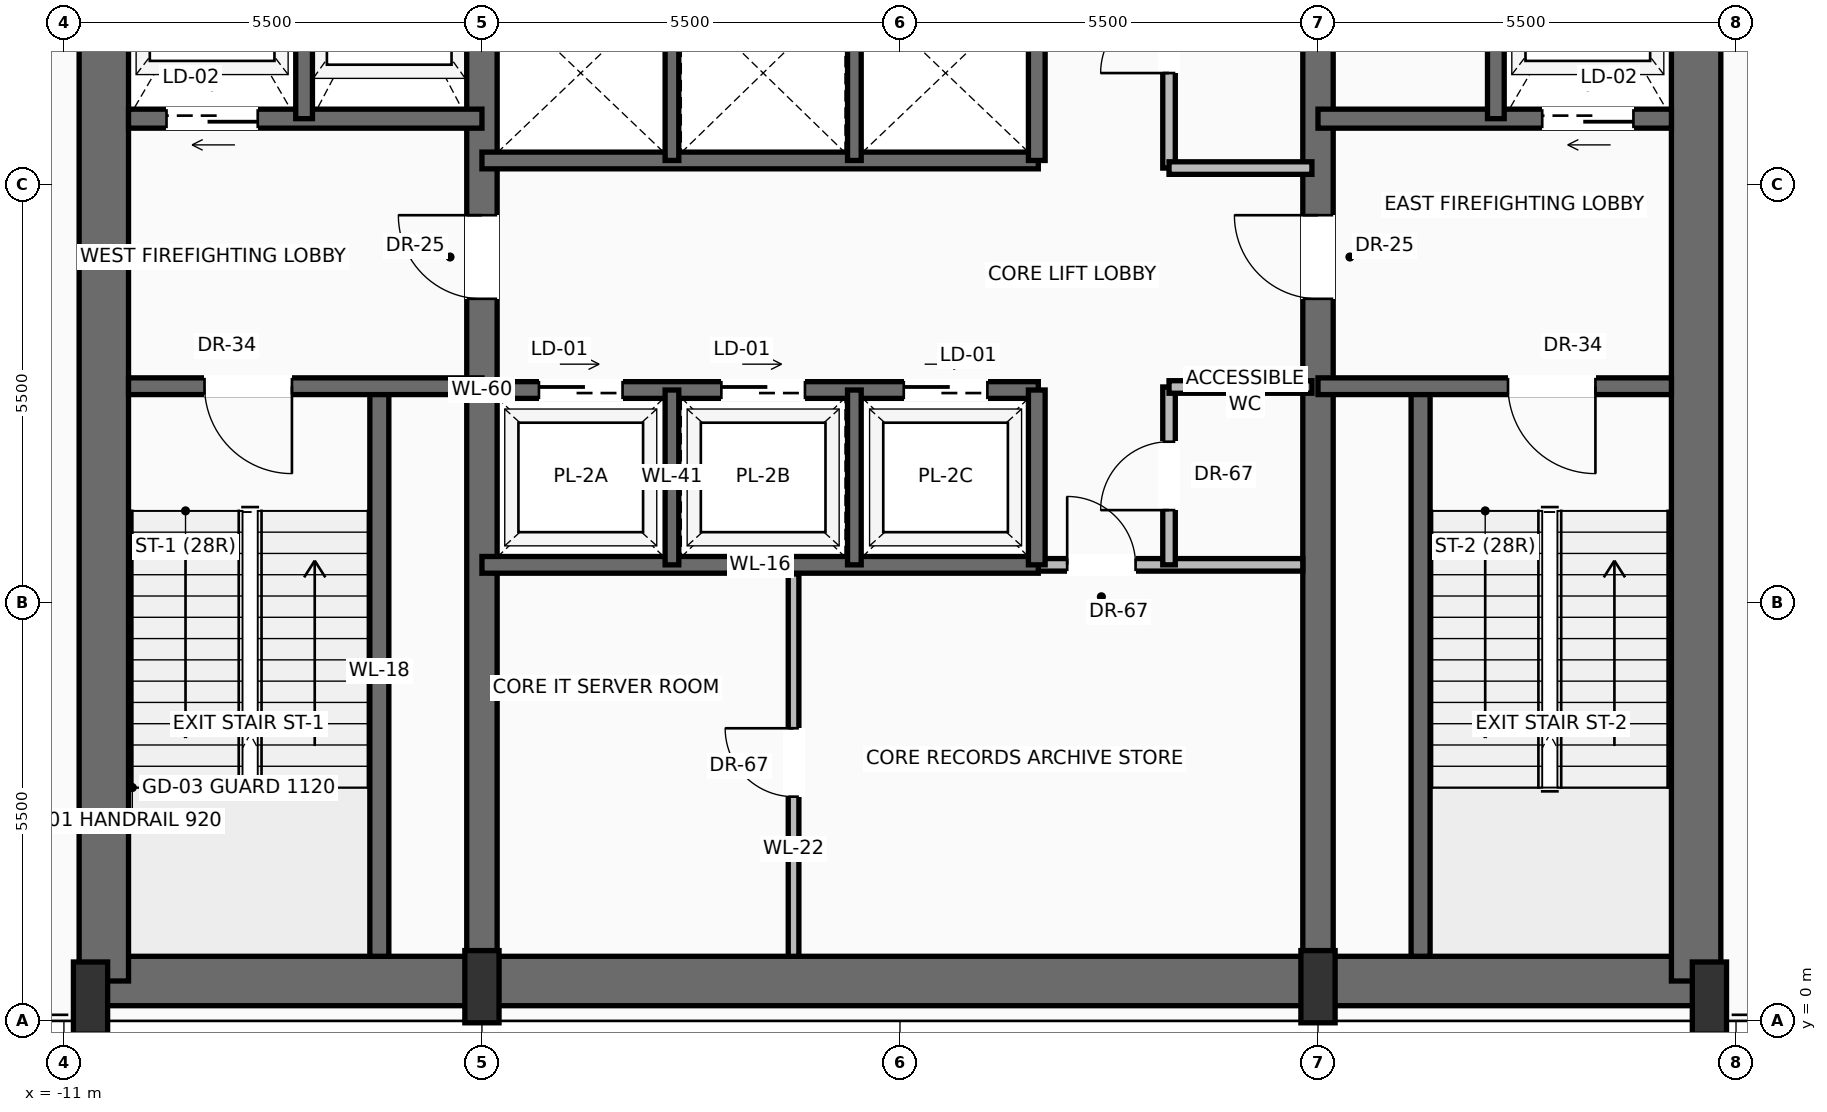
"""IFC4 building model, lengths in metres.
Left out: names, types, materials, properties, quantities, classifications, styles, units other than length and angle.
Written with IfcOpenShell. Run it as: python <this file> out.ifc"""

import sys

from ifc_helpers import new_model, si_unit, direction, frame, frame_2d, origin, origin_2d, place, context, subcontext, project, spatial, rectangle, extrude, source, transform, mapped, element, fill, save


model = new_model("IFC4")
c1 = context("Model", 3, precision=1e-05, world=origin(), true_north=direction((0.0, 1.0)))
c2 = subcontext(c1, "Body", "Model", "MODEL_VIEW")
j1 = project(units=[si_unit("LENGTHUNIT", "METRE"), si_unit("PLANEANGLEUNIT", "RADIAN")], contexts=[c1])
p1 = place(None, origin())
s1 = spatial("IfcSite", under=j1, at=p1, CompositionType="ELEMENT")
p2 = place(p1, origin())
s2 = spatial("IfcBuilding", under=s1, at=p2, CompositionType="ELEMENT")
p3 = place(p2, frame((0.0, 0.0, 166.3)))
s3 = spatial("IfcBuildingStorey", under=s2, at=p3, CompositionType="ELEMENT", Elevation=166.3)
p4 = place(p3, frame((-10.65, 0.525, 0.0), z_axis=(0.0, 0.0, 1.0), x_axis=(1.0, 0.0, 0.0)))
e1 = element("IfcWall", 1, at=p4, inside=s3, PredefinedType="SHEAR", context=c2, shape_type="SweptSolid", body=[
    extrude(rectangle(XDim=21.3, YDim=0.65, at=frame_2d((10.65, 0.0))), origin(), (0.0, 0.0, 1.0), 4.47),
])
for number, where, z_axis, x_axis in (
    (2, (-10.475, 0.525, 0.0), (0.0, 0.0, 1.0), (0.0, 1.0, 0.0)),
    (3, (10.475, 0.525, 0.0), (0.0, 0.0, 1.0), (0.0, 1.0, 0.0)),
):
    element("IfcWall", number, at=place(p3, frame(where, z_axis=z_axis, x_axis=x_axis)), inside=s3, PredefinedType="SHEAR", context=c2, shape_type="SweptSolid", body=[
        extrude(rectangle(XDim=15.55, YDim=0.65, at=frame_2d((7.775, 0.0))), origin(), (0.0, 0.0, 1.0), 4.47),
    ])
p5 = place(p3, frame((-5.5, 0.525, 0.0), z_axis=(0.0, 0.0, 1.0), x_axis=(0.0, 1.0, 0.0)))
e4 = element("IfcWall", 4, at=p5, inside=s3, PredefinedType="SHEAR", context=c2, shape_type="SweptSolid", body=[
    extrude(rectangle(XDim=15.55, YDim=0.4, at=frame_2d((7.775, 0.0))), origin(), (0.0, 0.0, 1.0), 4.47),
])
p6 = place(p5, frame((8.975, 0.0, 0.0)))
e5 = element("IfcOpeningElement", 5, at=p6, cuts=e4, PredefinedType="OPENING", context=c2, shape_type="SweptSolid", body=[
    extrude(rectangle(XDim=1.1, YDim=2.2, at=frame_2d((0.55, 1.1))), frame((0.0, 0.21, 0.0), z_axis=(0.0, -1.0, 0.0), x_axis=(1.0, 0.0, 0.0)), (0.0, 0.0, 1.0), 0.42),
])
p7 = place(p3, frame((5.5, 0.525, 0.0), z_axis=(0.0, 0.0, 1.0), x_axis=(0.0, 1.0, 0.0)))
e6 = element("IfcWall", 6, at=p7, inside=s3, PredefinedType="SHEAR", context=c2, shape_type="SweptSolid", body=[
    extrude(rectangle(XDim=15.55, YDim=0.4, at=frame_2d((7.775, 0.0))), origin(), (0.0, 0.0, 1.0), 4.47),
])
p8 = place(p7, frame((8.975, 0.0, 0.0)))
e7 = element("IfcOpeningElement", 7, at=p8, cuts=e6, PredefinedType="OPENING", context=c2, shape_type="SweptSolid", body=[
    extrude(rectangle(XDim=1.1, YDim=2.2, at=frame_2d((0.55, 1.1))), frame((0.0, 0.21, 0.0), z_axis=(0.0, -1.0, 0.0), x_axis=(1.0, 0.0, 0.0)), (0.0, 0.0, 1.0), 0.42),
])
m1 = source(origin(), c2, "Body", "SweptSolid", [
    extrude(rectangle(XDim=0.45, YDim=0.95, at=origin_2d()), origin(), (0.0, 0.0, 1.0), 4.7),
])
for number, where, z_axis, x_axis in (
    (8, (-10.65, 0.3, 0.0), (0.0, 0.0, 1.0), (1.0, 0.0, 0.0)),
    (9, (-5.5, 0.45, 0.0), (0.0, 0.0, 1.0), (1.0, 0.0, 0.0)),
    (10, (5.5, 0.45, 0.0), (0.0, 0.0, 1.0), (1.0, 0.0, 0.0)),
    (11, (10.65, 0.3, 0.0), (0.0, 0.0, 1.0), (1.0, 0.0, 0.0)),
):
    element("IfcColumn", number, at=place(p3, frame(where, z_axis=z_axis, x_axis=x_axis)), inside=s3, PredefinedType="PILASTER", context=c2, shape_type="MappedRepresentation", body=[
        mapped(m1, transform((0.0, 0.0, 0.0), scale=1.0)),
    ])
p9 = place(p3, frame((-6.85, 0.85, 0.0), z_axis=(0.0, 0.0, 1.0), x_axis=(0.0, 1.0, 0.0)))
e12 = element("IfcWall", 12, at=p9, inside=s3, PredefinedType="SOLIDWALL", context=c2, shape_type="SweptSolid", body=[
    extrude(rectangle(XDim=7.5, YDim=0.25, at=frame_2d((3.75, 0.0))), origin(), (0.0, 0.0, 1.0), 4.47),
])
p10 = place(p3, frame((-5.5, 8.35, 0.0), z_axis=(0.0, 0.0, 1.0), x_axis=(-1.0, 0.0, 0.0)))
e13 = element("IfcWall", 13, at=p10, inside=s3, PredefinedType="SOLIDWALL", context=c2, shape_type="SweptSolid", body=[
    extrude(rectangle(XDim=4.65, YDim=0.22, at=frame_2d((2.325, 0.0))), origin(), (0.0, 0.0, 1.0), 4.47),
])
p11 = place(p10, frame((2.5, 0.0, 0.0)))
e14 = element("IfcOpeningElement", 14, at=p11, cuts=e13, PredefinedType="OPENING", context=c2, shape_type="SweptSolid", body=[
    extrude(rectangle(XDim=1.15, YDim=2.2, at=frame_2d((0.575, 1.1))), frame((0.0, 0.12, 0.0), z_axis=(0.0, -1.0, 0.0), x_axis=(1.0, 0.0, 0.0)), (0.0, 0.0, 1.0), 0.24),
])
p12 = place(p3, frame((-5.5, 11.87, 0.0), z_axis=(0.0, 0.0, 1.0), x_axis=(-1.0, 0.0, 0.0)))
e15 = element("IfcWall", 15, at=p12, inside=s3, PredefinedType="SOLIDWALL", context=c2, shape_type="SweptSolid", body=[
    extrude(rectangle(XDim=4.65, YDim=0.25, at=frame_2d((2.325, 0.0))), origin(), (0.0, 0.0, 1.0), 4.47),
])
p13 = place(p12, frame((2.95, 0.0, 0.0)))
e16 = element("IfcOpeningElement", 16, at=p13, cuts=e15, PredefinedType="OPENING", context=c2, shape_type="SweptSolid", body=[
    extrude(rectangle(XDim=1.2, YDim=2.25, at=frame_2d((0.6, 1.125))), frame((0.0, 0.135, 0.0), z_axis=(0.0, -1.0, 0.0), x_axis=(1.0, 0.0, 0.0)), (0.0, 0.0, 1.0), 0.27),
])
p14 = place(p3, frame((-7.84, 11.87, 0.0), z_axis=(0.0, 0.0, 1.0), x_axis=(0.0, 1.0, 0.0)))
e17 = element("IfcWall", 17, at=p14, inside=s3, PredefinedType="SOLIDWALL", context=c2, shape_type="SweptSolid", body=[
    extrude(rectangle(XDim=3.88, YDim=0.22, at=frame_2d((1.94, 0.0))), origin(), (0.0, 0.0, 1.0), 4.47),
])
p15 = place(p3, frame((6.85, 0.85, 0.0), z_axis=(0.0, 0.0, 1.0), x_axis=(0.0, 1.0, 0.0)))
e18 = element("IfcWall", 18, at=p15, inside=s3, PredefinedType="SOLIDWALL", context=c2, shape_type="SweptSolid", body=[
    extrude(rectangle(XDim=7.5, YDim=0.25, at=frame_2d((3.75, 0.0))), origin(), (0.0, 0.0, 1.0), 4.47),
])
p16 = place(p3, frame((10.15, 8.35, 0.0), z_axis=(0.0, 0.0, 1.0), x_axis=(-1.0, 0.0, 0.0)))
e19 = element("IfcWall", 19, at=p16, inside=s3, PredefinedType="SOLIDWALL", context=c2, shape_type="SweptSolid", body=[
    extrude(rectangle(XDim=4.65, YDim=0.22, at=frame_2d((2.325, 0.0))), origin(), (0.0, 0.0, 1.0), 4.47),
])
p17 = place(p16, frame((1.0, 0.0, 0.0)))
e20 = element("IfcOpeningElement", 20, at=p17, cuts=e19, PredefinedType="OPENING", context=c2, shape_type="SweptSolid", body=[
    extrude(rectangle(XDim=1.15, YDim=2.2, at=frame_2d((0.575, 1.1))), frame((0.0, 0.12, 0.0), z_axis=(0.0, -1.0, 0.0), x_axis=(1.0, 0.0, 0.0)), (0.0, 0.0, 1.0), 0.24),
])
p18 = place(p3, frame((10.15, 11.87, 0.0), z_axis=(0.0, 0.0, 1.0), x_axis=(-1.0, 0.0, 0.0)))
e21 = element("IfcWall", 21, at=p18, inside=s3, PredefinedType="SOLIDWALL", context=c2, shape_type="SweptSolid", body=[
    extrude(rectangle(XDim=4.65, YDim=0.25, at=frame_2d((2.325, 0.0))), origin(), (0.0, 0.0, 1.0), 4.47),
])
p19 = place(p18, frame((0.5, 0.0, 0.0)))
e22 = element("IfcOpeningElement", 22, at=p19, cuts=e21, PredefinedType="OPENING", context=c2, shape_type="SweptSolid", body=[
    extrude(rectangle(XDim=1.2, YDim=2.25, at=frame_2d((0.6, 1.125))), frame((0.0, 0.135, 0.0), z_axis=(0.0, -1.0, 0.0), x_axis=(1.0, 0.0, 0.0)), (0.0, 0.0, 1.0), 0.27),
])
p20 = place(p3, frame((7.84, 11.87, 0.0), z_axis=(0.0, 0.0, 1.0), x_axis=(0.0, 1.0, 0.0)))
e23 = element("IfcWall", 23, at=p20, inside=s3, PredefinedType="SOLIDWALL", context=c2, shape_type="SweptSolid", body=[
    extrude(rectangle(XDim=3.88, YDim=0.22, at=frame_2d((1.94, 0.0))), origin(), (0.0, 0.0, 1.0), 4.47),
])
p21 = place(p3, frame((1.82, 6.0, 0.0), z_axis=(0.0, 0.0, 1.0), x_axis=(1.0, 0.0, 0.0)))
e24 = element("IfcWall", 24, at=p21, inside=s3, PredefinedType="PARTITIONING", context=c2, shape_type="SweptSolid", body=[
    extrude(rectangle(XDim=3.48, YDim=0.165, at=frame_2d((1.74, 0.0))), origin(), (0.0, 0.0, 1.0), 4.462),
])
p22 = place(p21, frame((0.38, 0.0, 0.0)))
e25 = element("IfcOpeningElement", 25, at=p22, cuts=e24, PredefinedType="OPENING", context=c2, shape_type="SweptSolid", body=[
    extrude(rectangle(XDim=0.9, YDim=2.1, at=frame_2d((0.45, 1.05))), frame((0.0, 0.093, 0.0), z_axis=(0.0, -1.0, 0.0), x_axis=(1.0, 0.0, 0.0)), (0.0, 0.0, 1.0), 0.185),
])
p23 = place(p3, frame((-1.4, 0.85, 0.0), z_axis=(0.0, 0.0, 1.0), x_axis=(0.0, 1.0, 0.0)))
e26 = element("IfcWall", 26, at=p23, inside=s3, PredefinedType="PARTITIONING", context=c2, shape_type="SweptSolid", body=[
    extrude(rectangle(XDim=5.03, YDim=0.14, at=frame_2d((2.515, 0.0))), origin(), (0.0, 0.0, 1.0), 4.462),
])
p24 = place(p23, frame((2.1, 0.0, 0.0)))
e27 = element("IfcOpeningElement", 27, at=p24, cuts=e26, PredefinedType="OPENING", context=c2, shape_type="SweptSolid", body=[
    extrude(rectangle(XDim=0.9, YDim=2.1, at=frame_2d((0.45, 1.05))), frame((0.0, 0.08, 0.0), z_axis=(0.0, -1.0, 0.0), x_axis=(1.0, 0.0, 0.0)), (0.0, 0.0, 1.0), 0.16),
])
p25 = place(p3, frame((3.54, 6.0, 0.0), z_axis=(0.0, 0.0, 1.0), x_axis=(0.0, 1.0, 0.0)))
e28 = element("IfcWall", 28, at=p25, inside=s3, PredefinedType="PARTITIONING", context=c2, shape_type="SweptSolid", body=[
    extrude(rectangle(XDim=2.34, YDim=0.165, at=frame_2d((1.17, 0.0))), origin(), (0.0, 0.0, 1.0), 4.462),
])
p26 = place(p25, frame((0.72, 0.0, 0.0)))
e29 = element("IfcOpeningElement", 29, at=p26, cuts=e28, PredefinedType="OPENING", context=c2, shape_type="SweptSolid", body=[
    extrude(rectangle(XDim=0.9, YDim=2.1, at=frame_2d((0.45, 1.05))), frame((0.0, 0.093, 0.0), z_axis=(0.0, -1.0, 0.0), x_axis=(1.0, 0.0, 0.0)), (0.0, 0.0, 1.0), 0.185),
])
p27 = place(p3, frame((3.54, 8.34, 0.0), z_axis=(0.0, 0.0, 1.0), x_axis=(1.0, 0.0, 0.0)))
e30 = element("IfcWall", 30, at=p27, inside=s3, PredefinedType="PARTITIONING", context=c2, shape_type="SweptSolid", body=[
    extrude(rectangle(XDim=1.88, YDim=0.165, at=frame_2d((0.94, 0.0))), origin(), (0.0, 0.0, 1.0), 4.462),
])
p28 = place(p3, frame((-5.5, 6.0, 0.0), z_axis=(0.0, 0.0, 1.0), x_axis=(1.0, 0.0, 0.0)))
e31 = element("IfcWall", 31, at=p28, inside=s3, PredefinedType="SOLIDWALL", context=c2, shape_type="SweptSolid", body=[
    extrude(rectangle(XDim=7.32, YDim=0.22, at=frame_2d((3.66, 0.0))), origin(), (0.0, 0.0, 1.0), 4.47),
])
p29 = place(p3, frame((-5.5, 8.3, 0.0), z_axis=(0.0, 0.0, 1.0), x_axis=(1.0, 0.0, 0.0)))
e32 = element("IfcWall", 32, at=p29, inside=s3, PredefinedType="SOLIDWALL", context=c2, shape_type="SweptSolid", body=[
    extrude(rectangle(XDim=7.32, YDim=0.22, at=frame_2d((3.66, 0.0))), origin(), (0.0, 0.0, 1.0), 4.47),
])
p30 = place(p29, frame((0.75, 0.0, 0.0)))
e33 = element("IfcOpeningElement", 33, at=p30, cuts=e32, PredefinedType="OPENING", context=c2, shape_type="SweptSolid", body=[
    extrude(rectangle(XDim=1.1, YDim=2.2, at=frame_2d((0.55, 1.1))), frame((0.0, 0.12, 0.0), z_axis=(0.0, -1.0, 0.0), x_axis=(1.0, 0.0, 0.0)), (0.0, 0.0, 1.0), 0.24),
])
p31 = place(p29, frame((3.15, 0.0, 0.0)))
e34 = element("IfcOpeningElement", 34, at=p31, cuts=e32, PredefinedType="OPENING", context=c2, shape_type="SweptSolid", body=[
    extrude(rectangle(XDim=1.1, YDim=2.2, at=frame_2d((0.55, 1.1))), frame((0.0, 0.12, 0.0), z_axis=(0.0, -1.0, 0.0), x_axis=(1.0, 0.0, 0.0)), (0.0, 0.0, 1.0), 0.24),
])
p32 = place(p29, frame((5.55, 0.0, 0.0)))
e35 = element("IfcOpeningElement", 35, at=p32, cuts=e32, PredefinedType="OPENING", context=c2, shape_type="SweptSolid", body=[
    extrude(rectangle(XDim=1.1, YDim=2.2, at=frame_2d((0.55, 1.1))), frame((0.0, 0.12, 0.0), z_axis=(0.0, -1.0, 0.0), x_axis=(1.0, 0.0, 0.0)), (0.0, 0.0, 1.0), 0.24),
])
p33 = place(p3, frame((1.8, 6.0, 0.0), z_axis=(0.0, 0.0, 1.0), x_axis=(0.0, 1.0, 0.0)))
e36 = element("IfcWall", 36, at=p33, inside=s3, PredefinedType="SOLIDWALL", context=c2, shape_type="SweptSolid", body=[
    extrude(rectangle(XDim=2.3, YDim=0.22, at=frame_2d((1.15, 0.0))), origin(), (0.0, 0.0, 1.0), 4.47),
])
for number, where, z_axis, x_axis in (
    (37, (-3.0, 6.0, 0.0), (0.0, 0.0, 1.0), (0.0, 1.0, 0.0)),
    (38, (-0.6, 6.0, 0.0), (0.0, 0.0, 1.0), (0.0, 1.0, 0.0)),
):
    element("IfcWall", number, at=place(p3, frame(where, z_axis=z_axis, x_axis=x_axis)), inside=s3, PredefinedType="SOLIDWALL", context=c2, shape_type="SweptSolid", body=[
        extrude(rectangle(XDim=2.3, YDim=0.18, at=frame_2d((1.15, 0.0))), origin(), (0.0, 0.0, 1.0), 4.47),
    ])
p34 = place(p3, frame((-5.5, 11.32, 0.0), z_axis=(0.0, 0.0, 1.0), x_axis=(1.0, 0.0, 0.0)))
e39 = element("IfcWall", 39, at=p34, inside=s3, PredefinedType="SOLIDWALL", context=c2, shape_type="SweptSolid", body=[
    extrude(rectangle(XDim=7.32, YDim=0.22, at=frame_2d((3.66, 0.0))), origin(), (0.0, 0.0, 1.0), 4.47),
])
p35 = place(p3, frame((1.8, 11.32, 0.0), z_axis=(0.0, 0.0, 1.0), x_axis=(0.0, 1.0, 0.0)))
e40 = element("IfcWall", 40, at=p35, inside=s3, PredefinedType="SOLIDWALL", context=c2, shape_type="SweptSolid", body=[
    extrude(rectangle(XDim=2.3, YDim=0.22, at=frame_2d((1.15, 0.0))), origin(), (0.0, 0.0, 1.0), 4.47),
])
for number, where, z_axis, x_axis in (
    (41, (-3.0, 11.32, 0.0), (0.0, 0.0, 1.0), (0.0, 1.0, 0.0)),
    (42, (-0.6, 11.32, 0.0), (0.0, 0.0, 1.0), (0.0, 1.0, 0.0)),
):
    element("IfcWall", number, at=place(p3, frame(where, z_axis=z_axis, x_axis=x_axis)), inside=s3, PredefinedType="SOLIDWALL", context=c2, shape_type="SweptSolid", body=[
        extrude(rectangle(XDim=2.3, YDim=0.18, at=frame_2d((1.15, 0.0))), origin(), (0.0, 0.0, 1.0), 4.47),
    ])
p36 = place(p3, frame((3.54, 11.22, 0.0), z_axis=(0.0, 0.0, 1.0), x_axis=(0.0, 1.0, 0.0)))
e43 = element("IfcWall", 43, at=p36, inside=s3, PredefinedType="PARTITIONING", context=c2, shape_type="SweptSolid", body=[
    extrude(rectangle(XDim=4.53, YDim=0.165, at=frame_2d((2.265, 0.0))), origin(), (0.0, 0.0, 1.0), 4.462),
])
p37 = place(p36, frame((1.25, 0.0, 0.0)))
e44 = element("IfcOpeningElement", 44, at=p37, cuts=e43, PredefinedType="OPENING", context=c2, shape_type="SweptSolid", body=[
    extrude(rectangle(XDim=0.9, YDim=2.1, at=frame_2d((0.45, 1.05))), frame((0.0, 0.093, 0.0), z_axis=(0.0, -1.0, 0.0), x_axis=(1.0, 0.0, 0.0)), (0.0, 0.0, 1.0), 0.185),
])
p38 = place(p3, frame((3.54, 11.22, 0.0), z_axis=(0.0, 0.0, 1.0), x_axis=(1.0, 0.0, 0.0)))
e45 = element("IfcWall", 45, at=p38, inside=s3, PredefinedType="PARTITIONING", context=c2, shape_type="SweptSolid", body=[
    extrude(rectangle(XDim=1.88, YDim=0.165, at=frame_2d((0.94, 0.0))), origin(), (0.0, 0.0, 1.0), 4.462),
])
m2 = source(origin(), c2, "Body", "SweptSolid", [
    extrude(rectangle(XDim=1.15, YDim=2.2, at=frame_2d((0.575, 1.1))), frame((0.0, 0.025, 0.0), z_axis=(0.0, -1.0, 0.0), x_axis=(1.0, 0.0, 0.0)), (0.0, 0.0, 1.0), 0.05),
])
p39 = place(p11, origin())
e46 = element("IfcDoor", 46, at=p39, inside=s3, OperationType="SINGLE_SWING_LEFT", PredefinedType="DOOR", context=c2, shape_type="MappedRepresentation", body=[
    mapped(m2, transform((0.0, 0.0, 0.0), scale=1.0)),
])
fill(e14, e46)
m3 = source(origin(), c2, "Body", "SweptSolid", [
    extrude(rectangle(XDim=1.1, YDim=2.2, at=frame_2d((0.55, 1.1))), frame((0.0, 0.025, 0.0), z_axis=(0.0, -1.0, 0.0), x_axis=(1.0, 0.0, 0.0)), (0.0, 0.0, 1.0), 0.05),
])
p40 = place(p6, origin())
e47 = element("IfcDoor", 47, at=p40, inside=s3, OperationType="SINGLE_SWING_RIGHT", PredefinedType="DOOR", context=c2, shape_type="MappedRepresentation", body=[
    mapped(m3, transform((0.0, 0.0, 0.0), scale=1.0)),
])
fill(e5, e47)
m4 = source(origin(), c2, "Body", "SweptSolid", [
    extrude(rectangle(XDim=1.2, YDim=2.25, at=frame_2d((0.6, 1.125))), frame((0.0, 0.025, 0.0), z_axis=(0.0, -1.0, 0.0), x_axis=(1.0, 0.0, 0.0)), (0.0, 0.0, 1.0), 0.05),
])
p41 = place(p13, origin())
e48 = element("IfcDoor", 48, at=p41, inside=s3, OperationType="SLIDING_TO_LEFT", PredefinedType="DOOR", context=c2, shape_type="MappedRepresentation", body=[
    mapped(m4, transform((0.0, 0.0, 0.0), scale=1.0)),
])
fill(e16, e48)
p42 = place(p17, origin())
e49 = element("IfcDoor", 49, at=p42, inside=s3, OperationType="SINGLE_SWING_LEFT", PredefinedType="DOOR", context=c2, shape_type="MappedRepresentation", body=[
    mapped(m2, transform((0.0, 0.0, 0.0), scale=1.0)),
])
fill(e20, e49)
p43 = place(p8, origin())
e50 = element("IfcDoor", 50, at=p43, inside=s3, OperationType="SINGLE_SWING_RIGHT", PredefinedType="DOOR", context=c2, shape_type="MappedRepresentation", body=[
    mapped(m3, transform((0.0, 0.0, 0.0), scale=1.0)),
])
fill(e7, e50)
p44 = place(p19, origin())
e51 = element("IfcDoor", 51, at=p44, inside=s3, OperationType="SLIDING_TO_RIGHT", PredefinedType="DOOR", context=c2, shape_type="MappedRepresentation", body=[
    mapped(m4, transform((0.0, 0.0, 0.0), scale=1.0)),
])
fill(e22, e51)
m5 = source(origin(), c2, "Body", "SweptSolid", [
    extrude(rectangle(XDim=0.9, YDim=2.1, at=frame_2d((0.45, 1.05))), frame((0.0, 0.025, 0.0), z_axis=(0.0, -1.0, 0.0), x_axis=(1.0, 0.0, 0.0)), (0.0, 0.0, 1.0), 0.05),
])
p45 = place(p22, origin())
e52 = element("IfcDoor", 52, at=p45, inside=s3, OperationType="SINGLE_SWING_LEFT", PredefinedType="DOOR", context=c2, shape_type="MappedRepresentation", body=[
    mapped(m5, transform((0.0, 0.0, 0.0), scale=1.0)),
])
fill(e25, e52)
p46 = place(p24, origin())
e53 = element("IfcDoor", 53, at=p46, inside=s3, OperationType="SINGLE_SWING_RIGHT", PredefinedType="DOOR", context=c2, shape_type="MappedRepresentation", body=[
    mapped(m5, transform((0.0, 0.0, 0.0), scale=1.0)),
])
fill(e27, e53)
p47 = place(p26, origin())
e54 = element("IfcDoor", 54, at=p47, inside=s3, OperationType="SINGLE_SWING_LEFT", PredefinedType="DOOR", context=c2, shape_type="MappedRepresentation", body=[
    mapped(m5, transform((0.0, 0.0, 0.0), scale=1.0)),
])
fill(e29, e54)
m6 = source(origin(), c2, "Body", "SweptSolid", [
    extrude(rectangle(XDim=1.1, YDim=2.2, at=frame_2d((0.55, 1.1))), frame((0.0, 0.025, 0.0), z_axis=(0.0, -1.0, 0.0), x_axis=(1.0, 0.0, 0.0)), (0.0, 0.0, 1.0), 0.05),
])
p48 = place(p30, origin())
e55 = element("IfcDoor", 55, at=p48, inside=s3, OperationType="SLIDING_TO_LEFT", PredefinedType="DOOR", context=c2, shape_type="MappedRepresentation", body=[
    mapped(m6, transform((0.0, 0.0, 0.0), scale=1.0)),
])
fill(e33, e55)
p49 = place(p31, origin())
e56 = element("IfcDoor", 56, at=p49, inside=s3, OperationType="SLIDING_TO_LEFT", PredefinedType="DOOR", context=c2, shape_type="MappedRepresentation", body=[
    mapped(m6, transform((0.0, 0.0, 0.0), scale=1.0)),
])
fill(e34, e56)
p50 = place(p32, origin())
e57 = element("IfcDoor", 57, at=p50, inside=s3, OperationType="SLIDING_TO_LEFT", PredefinedType="DOOR", context=c2, shape_type="MappedRepresentation", body=[
    mapped(m6, transform((0.0, 0.0, 0.0), scale=1.0)),
])
fill(e35, e57)
p51 = place(p37, origin())
e58 = element("IfcDoor", 58, at=p51, inside=s3, OperationType="SINGLE_SWING_LEFT", PredefinedType="DOOR", context=c2, shape_type="MappedRepresentation", body=[
    mapped(m5, transform((0.0, 0.0, 0.0), scale=1.0)),
])
fill(e44, e58)
save(model, sys.argv[1])
